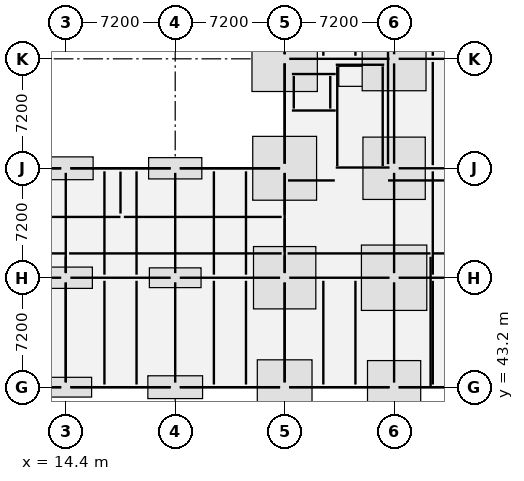
"""IFC4 building model, lengths in metres.
Left out: names, types, materials, properties, quantities, classifications, styles, units other than length and angle.
Written with IfcOpenShell. Run it as: python <this file> out.ifc"""

import sys

from ifc_helpers import new_model, si_unit, direction, frame, frame_2d, origin, origin_2d, place, context, subcontext, project, spatial, rectangle, extrude, element, fill, save


model = new_model("IFC4")
c1 = context("Model", 3, precision=1e-05, world=origin(), true_north=direction((0.0, 1.0)))
c2 = subcontext(c1, "Body", "Model", "MODEL_VIEW")
j1 = project(units=[si_unit("LENGTHUNIT", "METRE"), si_unit("PLANEANGLEUNIT", "RADIAN")], contexts=[c1])
p1 = place(None, origin())
s1 = spatial("IfcSite", under=j1, at=p1, CompositionType="ELEMENT")
p2 = place(p1, origin())
s2 = spatial("IfcBuilding", under=s1, at=p2, CompositionType="ELEMENT")
p3 = place(p2, origin())
s3 = spatial("IfcBuildingStorey", under=s2, at=p3, CompositionType="ELEMENT", Elevation=0.0)
for number, where, z_axis, x_axis in (
    (1, (14.4, 43.2, 0.0), (0.0, 0.0, 1.0), (1.0, 0.0, 0.0)),
    (2, (14.4, 50.4, 0.0), (0.0, 0.0, 1.0), (1.0, 0.0, 0.0)),
    (3, (14.4, 57.6, 0.0), (0.0, 0.0, 1.0), (1.0, 0.0, 0.0)),
    (4, (21.6, 43.2, 0.0), (0.0, 0.0, 1.0), (1.0, 0.0, 0.0)),
    (5, (21.6, 50.4, 0.0), (0.0, 0.0, 1.0), (1.0, 0.0, 0.0)),
    (6, (21.6, 57.6, 0.0), (0.0, 0.0, 1.0), (1.0, 0.0, 0.0)),
    (7, (28.8, 43.2, 0.0), (0.0, 0.0, 1.0), (1.0, 0.0, 0.0)),
    (8, (28.8, 50.4, 0.0), (0.0, 0.0, 1.0), (1.0, 0.0, 0.0)),
    (9, (28.8, 57.6, 0.0), (0.0, 0.0, 1.0), (1.0, 0.0, 0.0)),
    (10, (28.8, 64.8, 0.0), (0.0, 0.0, 1.0), (1.0, 0.0, 0.0)),
    (11, (36.0, 43.2, 0.0), (0.0, 0.0, 1.0), (1.0, 0.0, 0.0)),
    (12, (36.0, 50.4, 0.0), (0.0, 0.0, 1.0), (1.0, 0.0, 0.0)),
    (13, (36.0, 57.6, 0.0), (0.0, 0.0, 1.0), (1.0, 0.0, 0.0)),
    (14, (36.0, 64.8, 0.0), (0.0, 0.0, 1.0), (1.0, 0.0, 0.0)),
):
    element("IfcColumn", number, at=place(p3, frame(where, z_axis=z_axis, x_axis=x_axis)), inside=s3, PredefinedType="COLUMN", context=c2, shape_type="SweptSolid", body=[
        extrude(rectangle(XDim=0.6, YDim=0.6, at=origin_2d()), origin(), (0.0, 0.0, 1.0), 5.4),
    ])
p4 = place(p3, frame((29.275, 61.4, 0.0), z_axis=(0.0, 0.0, 1.0), x_axis=(1.0, 0.0, 0.0)))
e15 = element("IfcWall", 15, at=p4, inside=s3, PredefinedType="SHEAR", context=c2, shape_type="SweptSolid", body=[
    extrude(rectangle(XDim=2.885, YDim=0.25, at=frame_2d((1.442, 0.0))), origin(), (0.0, 0.0, 1.0), 5.15),
])
p5 = place(p4, frame((0.942, 0.0, 0.0)))
e16 = element("IfcOpeningElement", 16, at=p5, cuts=e15, PredefinedType="OPENING", context=c2, shape_type="SweptSolid", body=[
    extrude(rectangle(XDim=1.0, YDim=2.1, at=frame_2d((0.5, 1.05))), frame((0.0, 0.137, 0.0), z_axis=(0.0, -1.0, 0.0), x_axis=(1.0, 0.0, 0.0)), (0.0, 0.0, 1.0), 0.274),
])
p6 = place(p3, frame((29.275, 63.8, 0.0), z_axis=(0.0, 0.0, 1.0), x_axis=(1.0, 0.0, 0.0)))
e17 = element("IfcWall", 17, at=p6, inside=s3, PredefinedType="SHEAR", context=c2, shape_type="SweptSolid", body=[
    extrude(rectangle(XDim=2.885, YDim=0.25, at=frame_2d((1.442, 0.0))), origin(), (0.0, 0.0, 1.0), 5.15),
])
for number, where, z_axis, x_axis in (
    (18, (29.4, 61.525, 0.0), (0.0, 0.0, 1.0), (0.0, 1.0, 0.0)),
    (19, (31.8, 61.525, 0.0), (0.0, 0.0, 1.0), (0.0, 1.0, 0.0)),
):
    element("IfcWall", number, at=place(p3, frame(where, z_axis=z_axis, x_axis=x_axis)), inside=s3, PredefinedType="SHEAR", context=c2, shape_type="SweptSolid", body=[
        extrude(rectangle(XDim=2.15, YDim=0.25, at=frame_2d((1.075, 0.0))), origin(), (0.0, 0.0, 1.0), 5.15),
    ])
p7 = place(p3, frame((32.16, 57.65, 0.0), z_axis=(0.0, 0.0, 1.0), x_axis=(1.0, 0.0, 0.0)))
e20 = element("IfcWall", 20, at=p7, inside=s3, PredefinedType="SHEAR", context=c2, shape_type="SweptSolid", body=[
    extrude(rectangle(XDim=3.54, YDim=0.2, at=frame_2d((1.77, 0.0))), origin(), (0.0, 0.0, 1.0), 5.15),
])
p8 = place(p7, frame((1.22, 0.0, 0.0)))
e21 = element("IfcOpeningElement", 21, at=p8, cuts=e20, PredefinedType="OPENING", context=c2, shape_type="SweptSolid", body=[
    extrude(rectangle(XDim=1.1, YDim=2.15, at=frame_2d((0.55, 1.075))), frame((0.0, 0.112, 0.0), z_axis=(0.0, -1.0, 0.0), x_axis=(1.0, 0.0, 0.0)), (0.0, 0.0, 1.0), 0.224),
])
p9 = place(p3, frame((32.16, 64.41, 0.0), z_axis=(0.0, 0.0, 1.0), x_axis=(1.0, 0.0, 0.0)))
e22 = element("IfcWall", 22, at=p9, inside=s3, PredefinedType="SHEAR", context=c2, shape_type="SweptSolid", body=[
    extrude(rectangle(XDim=3.19, YDim=0.2, at=frame_2d((1.595, 0.0))), origin(), (0.0, 0.0, 1.0), 5.15),
])
for number, where, z_axis, x_axis in (
    (23, (32.26, 57.75, 0.0), (0.0, 0.0, 1.0), (0.0, 1.0, 0.0)),
    (24, (35.25, 57.75, 0.0), (0.0, 0.0, 1.0), (0.0, 1.0, 0.0)),
):
    element("IfcWall", number, at=place(p3, frame(where, z_axis=z_axis, x_axis=x_axis)), inside=s3, PredefinedType="SHEAR", context=c2, shape_type="SweptSolid", body=[
        extrude(rectangle(XDim=6.56, YDim=0.2, at=frame_2d((3.28, 0.0))), origin(), (0.0, 0.0, 1.0), 5.15),
    ])
p10 = place(p3, frame((7.5, 57.6, 0.0), z_axis=(0.0, 0.0, 1.0), x_axis=(1.0, 0.0, 0.0)))
e25 = element("IfcWall", 25, at=p10, inside=s3, PredefinedType="ELEMENTEDWALL", context=c2, shape_type="SweptSolid", body=[
    extrude(rectangle(XDim=6.6, YDim=0.32, at=frame_2d((3.3, 0.0))), origin(), (0.0, 0.0, 1.0), 4.39),
])
p11 = place(p10, frame((2.4, 0.0, 0.85)))
e26 = element("IfcOpeningElement", 26, at=p11, cuts=e25, PredefinedType="OPENING", context=c2, shape_type="SweptSolid", body=[
    extrude(rectangle(XDim=1.8, YDim=2.2, at=frame_2d((0.9, 1.1))), frame((0.0, 0.172, 0.0), z_axis=(0.0, -1.0, 0.0), x_axis=(1.0, 0.0, 0.0)), (0.0, 0.0, 1.0), 0.344),
])
p12 = place(p3, frame((17.8, 57.6, 0.0), z_axis=(0.0, 0.0, 1.0), x_axis=(1.0, 0.0, 0.0)))
e27 = element("IfcWall", 27, at=p12, inside=s3, PredefinedType="SOLIDWALL", context=c2, shape_type="SweptSolid", body=[
    extrude(rectangle(XDim=0.4, YDim=0.36, at=frame_2d((0.2, 0.0))), origin(), (0.0, 0.0, 1.0), 4.45),
])
p13 = place(p3, frame((21.9, 57.6, 0.0), z_axis=(0.0, 0.0, 1.0), x_axis=(1.0, 0.0, 0.0)))
e28 = element("IfcWall", 28, at=p13, inside=s3, PredefinedType="ELEMENTEDWALL", context=c2, shape_type="SweptSolid", body=[
    extrude(rectangle(XDim=6.6, YDim=0.32, at=frame_2d((3.3, 0.0))), origin(), (0.0, 0.0, 1.0), 4.4),
])
p14 = place(p13, frame((2.625, 0.0, 0.85)))
e29 = element("IfcOpeningElement", 29, at=p14, cuts=e28, PredefinedType="OPENING", context=c2, shape_type="SweptSolid", body=[
    extrude(rectangle(XDim=1.35, YDim=2.0, at=frame_2d((0.675, 1.0))), frame((0.0, 0.172, 0.0), z_axis=(0.0, -1.0, 0.0), x_axis=(1.0, 0.0, 0.0)), (0.0, 0.0, 1.0), 0.344),
])
p15 = place(p3, frame((28.8, 61.0, 0.0), z_axis=(0.0, 0.0, 1.0), x_axis=(0.0, 1.0, 0.0)))
e30 = element("IfcWall", 30, at=p15, inside=s3, PredefinedType="SOLIDWALL", context=c2, shape_type="SweptSolid", body=[
    extrude(rectangle(XDim=0.4, YDim=0.36, at=frame_2d((0.2, 0.0))), origin(), (0.0, 0.0, 1.0), 4.54),
])
p16 = place(p3, frame((35.7, 43.2, 0.0), z_axis=(0.0, 0.0, 1.0), x_axis=(-1.0, 0.0, 0.0)))
e31 = element("IfcWall", 31, at=p16, inside=s3, PredefinedType="ELEMENTEDWALL", context=c2, shape_type="SweptSolid", body=[
    extrude(rectangle(XDim=6.6, YDim=0.32, at=frame_2d((3.3, 0.0))), origin(), (0.0, 0.0, 1.0), 4.49),
])
p17 = place(p16, frame((2.625, 0.0, 0.85)))
e32 = element("IfcOpeningElement", 32, at=p17, cuts=e31, PredefinedType="OPENING", context=c2, shape_type="SweptSolid", body=[
    extrude(rectangle(XDim=1.35, YDim=2.0, at=frame_2d((0.675, 1.0))), frame((0.0, 0.172, 0.0), z_axis=(0.0, -1.0, 0.0), x_axis=(1.0, 0.0, 0.0)), (0.0, 0.0, 1.0), 0.344),
])
p18 = place(p3, frame((25.4, 43.2, 0.0), z_axis=(0.0, 0.0, 1.0), x_axis=(-1.0, 0.0, 0.0)))
e33 = element("IfcWall", 33, at=p18, inside=s3, PredefinedType="SOLIDWALL", context=c2, shape_type="SweptSolid", body=[
    extrude(rectangle(XDim=0.4, YDim=0.36, at=frame_2d((0.2, 0.0))), origin(), (0.0, 0.0, 1.0), 4.5),
])
p19 = place(p3, frame((21.3, 43.2, 0.0), z_axis=(0.0, 0.0, 1.0), x_axis=(-1.0, 0.0, 0.0)))
e34 = element("IfcWall", 34, at=p19, inside=s3, PredefinedType="ELEMENTEDWALL", context=c2, shape_type="SweptSolid", body=[
    extrude(rectangle(XDim=6.6, YDim=0.32, at=frame_2d((3.3, 0.0))), origin(), (0.0, 0.0, 1.0), 4.5),
])
p20 = place(p19, frame((2.75, 0.0, 0.85)))
e35 = element("IfcOpeningElement", 35, at=p20, cuts=e34, PredefinedType="OPENING", context=c2, shape_type="SweptSolid", body=[
    extrude(rectangle(XDim=1.1, YDim=1.75, at=frame_2d((0.55, 0.875))), frame((0.0, 0.172, 0.0), z_axis=(0.0, -1.0, 0.0), x_axis=(1.0, 0.0, 0.0)), (0.0, 0.0, 1.0), 0.344),
])
p21 = place(p3, frame((28.8, 52.1, 0.0), z_axis=(0.0, 0.0, 1.0), x_axis=(0.0, 1.0, 0.0)))
e36 = element("IfcWall", 36, at=p21, inside=s3, PredefinedType="PARTITIONING", context=c2, shape_type="SweptSolid", body=[
    extrude(rectangle(XDim=2.2, YDim=0.14, at=frame_2d((1.1, 0.0))), origin(), (0.0, 0.0, 1.0), 4.488),
])
p22 = place(p21, frame((0.25, 0.0, 0.0)))
e37 = element("IfcOpeningElement", 37, at=p22, cuts=e36, PredefinedType="OPENING", context=c2, shape_type="SweptSolid", body=[
    extrude(rectangle(XDim=1.65, YDim=2.2, at=frame_2d((0.825, 1.1))), frame((0.0, 0.082, 0.0), z_axis=(0.0, -1.0, 0.0), x_axis=(1.0, 0.0, 0.0)), (0.0, 0.0, 1.0), 0.164),
])
p23 = place(p3, frame((0.22, 52.0, 0.0), z_axis=(0.0, 0.0, 1.0), x_axis=(1.0, 0.0, 0.0)))
e38 = element("IfcWall", 38, at=p23, inside=s3, PredefinedType="PARTITIONING", context=c2, shape_type="SweptSolid", body=[
    extrude(rectangle(XDim=14.18, YDim=0.12, at=frame_2d((7.09, 0.0))), origin(), (0.0, 0.0, 1.0), 4.488),
])
p24 = place(p23, frame((7.59, 0.0, 0.0)))
e39 = element("IfcOpeningElement", 39, at=p24, cuts=e38, PredefinedType="OPENING", context=c2, shape_type="SweptSolid", body=[
    extrude(rectangle(XDim=1.0, YDim=2.15, at=frame_2d((0.5, 1.075))), frame((0.0, 0.072, 0.0), z_axis=(0.0, -1.0, 0.0), x_axis=(1.0, 0.0, 0.0)), (0.0, 0.0, 1.0), 0.144),
])
p25 = place(p3, frame((14.4, 43.54, 0.0), z_axis=(0.0, 0.0, 1.0), x_axis=(0.0, 1.0, 0.0)))
e40 = element("IfcWall", 40, at=p25, inside=s3, PredefinedType="PARTITIONING", context=c2, shape_type="SweptSolid", body=[
    extrude(rectangle(XDim=6.52, YDim=0.12, at=frame_2d((3.26, 0.0))), origin(), (0.0, 0.0, 1.0), 4.548),
])
p26 = place(p3, frame((14.4, 50.74, 0.0), z_axis=(0.0, 0.0, 1.0), x_axis=(0.0, 1.0, 0.0)))
e41 = element("IfcWall", 41, at=p26, inside=s3, PredefinedType="PARTITIONING", context=c2, shape_type="SweptSolid", body=[
    extrude(rectangle(XDim=1.04, YDim=0.12, at=frame_2d((0.52, 0.0))), origin(), (0.0, 0.0, 1.0), 4.498),
])
p27 = place(p3, frame((14.62, 52.0, 0.0), z_axis=(0.0, 0.0, 1.0), x_axis=(1.0, 0.0, 0.0)))
e42 = element("IfcWall", 42, at=p27, inside=s3, PredefinedType="PARTITIONING", context=c2, shape_type="SweptSolid", body=[
    extrude(rectangle(XDim=13.984, YDim=0.1, at=frame_2d((6.992, 0.0))), origin(), (0.0, 0.0, 1.0), 4.498),
])
p28 = place(p27, frame((5.492, 0.0, 0.0)))
e43 = element("IfcOpeningElement", 43, at=p28, cuts=e42, PredefinedType="OPENING", context=c2, shape_type="SweptSolid", body=[
    extrude(rectangle(XDim=1.0, YDim=2.15, at=frame_2d((0.5, 1.075))), frame((0.0, 0.062, 0.0), z_axis=(0.0, -1.0, 0.0), x_axis=(1.0, 0.0, 0.0)), (0.0, 0.0, 1.0), 0.124),
])
p29 = place(p3, frame((28.8, 43.54, 0.0), z_axis=(0.0, 0.0, 1.0), x_axis=(0.0, 1.0, 0.0)))
e44 = element("IfcWall", 44, at=p29, inside=s3, PredefinedType="PARTITIONING", context=c2, shape_type="SweptSolid", body=[
    extrude(rectangle(XDim=6.52, YDim=0.1, at=frame_2d((3.26, 0.0))), origin(), (0.0, 0.0, 1.0), 4.538),
])
p30 = place(p3, frame((28.8, 50.74, 0.0), z_axis=(0.0, 0.0, 1.0), x_axis=(0.0, 1.0, 0.0)))
e45 = element("IfcWall", 45, at=p30, inside=s3, PredefinedType="PARTITIONING", context=c2, shape_type="SweptSolid", body=[
    extrude(rectangle(XDim=1.14, YDim=0.1, at=frame_2d((0.57, 0.0))), origin(), (0.0, 0.0, 1.0), 4.488),
])
p31 = place(p3, frame((0.22, 54.4, 0.0), z_axis=(0.0, 0.0, 1.0), x_axis=(1.0, 0.0, 0.0)))
e46 = element("IfcWall", 46, at=p31, inside=s3, PredefinedType="PARTITIONING", context=c2, shape_type="SweptSolid", body=[
    extrude(rectangle(XDim=17.78, YDim=0.12, at=frame_2d((8.89, 0.0))), origin(), (0.0, 0.0, 1.0), 4.488),
])
p32 = place(p31, frame((8.39, 0.0, 0.0)))
e47 = element("IfcOpeningElement", 47, at=p32, cuts=e46, PredefinedType="OPENING", context=c2, shape_type="SweptSolid", body=[
    extrude(rectangle(XDim=1.0, YDim=2.15, at=frame_2d((0.5, 1.075))), frame((0.0, 0.072, 0.0), z_axis=(0.0, -1.0, 0.0), x_axis=(1.0, 0.0, 0.0)), (0.0, 0.0, 1.0), 0.144),
])
p33 = place(p3, frame((18.0, 54.62, 0.0), z_axis=(0.0, 0.0, 1.0), x_axis=(0.0, 1.0, 0.0)))
e48 = element("IfcWall", 48, at=p33, inside=s3, PredefinedType="PARTITIONING", context=c2, shape_type="SweptSolid", body=[
    extrude(rectangle(XDim=2.76, YDim=0.12, at=frame_2d((1.38, 0.0))), origin(), (0.0, 0.0, 1.0), 4.448),
])
p34 = place(p3, frame((18.22, 54.4, 0.0), z_axis=(0.0, 0.0, 1.0), x_axis=(1.0, 0.0, 0.0)))
e49 = element("IfcWall", 49, at=p34, inside=s3, PredefinedType="PLUMBINGWALL", context=c2, shape_type="SweptSolid", body=[
    extrude(rectangle(XDim=10.384, YDim=0.18, at=frame_2d((5.192, 0.0))), origin(), (0.0, 0.0, 1.0), 4.498),
])
p35 = place(p34, frame((4.742, 0.0, 0.0)))
e50 = element("IfcOpeningElement", 50, at=p35, cuts=e49, PredefinedType="OPENING", context=c2, shape_type="SweptSolid", body=[
    extrude(rectangle(XDim=0.9, YDim=2.1, at=frame_2d((0.45, 1.05))), frame((0.0, 0.102, 0.0), z_axis=(0.0, -1.0, 0.0), x_axis=(1.0, 0.0, 0.0)), (0.0, 0.0, 1.0), 0.204),
])
p36 = place(p3, frame((28.8, 54.52, 0.0), z_axis=(0.0, 0.0, 1.0), x_axis=(0.0, 1.0, 0.0)))
e51 = element("IfcWall", 51, at=p36, inside=s3, PredefinedType="PLUMBINGWALL", context=c2, shape_type="SweptSolid", body=[
    extrude(rectangle(XDim=2.74, YDim=0.18, at=frame_2d((1.37, 0.0))), origin(), (0.0, 0.0, 1.0), 4.488),
])
p37 = place(p3, frame((29.02, 56.8, 0.0), z_axis=(0.0, 0.0, 1.0), x_axis=(1.0, 0.0, 0.0)))
e52 = element("IfcWall", 52, at=p37, inside=s3, PredefinedType="STANDARD", context=c2, shape_type="SweptSolid", body=[
    extrude(rectangle(XDim=3.08, YDim=0.22, at=frame_2d((1.54, 0.0))), origin(), (0.0, 0.0, 1.0), 5.12),
])
p38 = place(p37, frame((0.94, 0.0, 0.0)))
e53 = element("IfcOpeningElement", 53, at=p38, cuts=e52, PredefinedType="OPENING", context=c2, shape_type="SweptSolid", body=[
    extrude(rectangle(XDim=1.2, YDim=2.2, at=frame_2d((0.6, 1.1))), frame((0.0, 0.122, 0.0), z_axis=(0.0, -1.0, 0.0), x_axis=(1.0, 0.0, 0.0)), (0.0, 0.0, 1.0), 0.244),
])
p39 = place(p3, frame((28.996, 52.0, 0.0), z_axis=(0.0, 0.0, 1.0), x_axis=(1.0, 0.0, 0.0)))
e54 = element("IfcWall", 54, at=p39, inside=s3, PredefinedType="PLUMBINGWALL", context=c2, shape_type="SweptSolid", body=[
    extrude(rectangle(XDim=9.404, YDim=0.18, at=frame_2d((4.702, 0.0))), origin(), (0.0, 0.0, 1.0), 4.488),
])
p40 = place(p39, frame((4.202, 0.0, 0.0)))
e55 = element("IfcOpeningElement", 55, at=p40, cuts=e54, PredefinedType="OPENING", context=c2, shape_type="SweptSolid", body=[
    extrude(rectangle(XDim=1.0, YDim=2.15, at=frame_2d((0.5, 1.075))), frame((0.0, 0.102, 0.0), z_axis=(0.0, -1.0, 0.0), x_axis=(1.0, 0.0, 0.0)), (0.0, 0.0, 1.0), 0.204),
])
p41 = place(p3, frame((38.4, 43.2, 0.0), z_axis=(0.0, 0.0, 1.0), x_axis=(0.0, 1.0, 0.0)))
e56 = element("IfcWall", 56, at=p41, inside=s3, PredefinedType="PLUMBINGWALL", context=c2, shape_type="SweptSolid", body=[
    extrude(rectangle(XDim=8.58, YDim=0.18, at=frame_2d((4.29, 0.0))), origin(), (0.0, 0.0, 1.0), 4.388),
])
p42 = place(p3, frame((38.62, 52.0, 0.0), z_axis=(0.0, 0.0, 1.0), x_axis=(1.0, 0.0, 0.0)))
e57 = element("IfcWall", 57, at=p42, inside=s3, PredefinedType="PLUMBINGWALL", context=c2, shape_type="SweptSolid", body=[
    extrude(rectangle(XDim=8.78, YDim=0.18, at=frame_2d((4.39, 0.0))), origin(), (0.0, 0.0, 1.0), 4.488),
])
p43 = place(p42, frame((3.19, 0.0, 0.0)))
e58 = element("IfcOpeningElement", 58, at=p43, cuts=e57, PredefinedType="OPENING", context=c2, shape_type="SweptSolid", body=[
    extrude(rectangle(XDim=0.9, YDim=2.1, at=frame_2d((0.45, 1.05))), frame((0.0, 0.102, 0.0), z_axis=(0.0, -1.0, 0.0), x_axis=(1.0, 0.0, 0.0)), (0.0, 0.0, 1.0), 0.204),
])
p44 = place(p3, frame((35.6, 56.8, 0.0), z_axis=(0.0, 0.0, 1.0), x_axis=(1.0, 0.0, 0.0)))
e59 = element("IfcWall", 59, at=p44, inside=s3, PredefinedType="PARTITIONING", context=c2, shape_type="SweptSolid", body=[
    extrude(rectangle(XDim=17.2, YDim=0.12, at=frame_2d((8.6, 0.0))), origin(), (0.0, 0.0, 1.0), 4.488),
])
p45 = place(p44, frame((8.225, 0.0, 0.0)))
e60 = element("IfcOpeningElement", 60, at=p45, cuts=e59, PredefinedType="OPENING", context=c2, shape_type="SweptSolid", body=[
    extrude(rectangle(XDim=1.25, YDim=2.15, at=frame_2d((0.625, 1.075))), frame((0.0, 0.072, 0.0), z_axis=(0.0, -1.0, 0.0), x_axis=(1.0, 0.0, 0.0)), (0.0, 0.0, 1.0), 0.144),
])
p46 = place(p3, frame((35.6, 57.87, 0.0), z_axis=(0.0, 0.0, 1.0), x_axis=(0.0, 1.0, 0.0)))
e61 = element("IfcWall", 61, at=p46, inside=s3, PredefinedType="PARTITIONING", context=c2, shape_type="SweptSolid", body=[
    extrude(rectangle(XDim=14.13, YDim=0.12, at=frame_2d((7.065, 0.0))), origin(), (0.0, 0.0, 1.0), 4.438),
])
p47 = place(p14, origin())
e62 = element("IfcWindow", 62, at=p47, inside=s3, PartitioningType="SINGLE_PANEL", PredefinedType="WINDOW", context=c2, shape_type="SweptSolid", body=[
    extrude(rectangle(XDim=1.35, YDim=2.0, at=frame_2d((0.675, 1.0))), frame((0.0, 0.03, 0.0), z_axis=(0.0, -1.0, 0.0), x_axis=(1.0, 0.0, 0.0)), (0.0, 0.0, 1.0), 0.06),
])
fill(e29, e62)
p48 = place(p17, origin())
e63 = element("IfcWindow", 63, at=p48, inside=s3, PartitioningType="SINGLE_PANEL", PredefinedType="WINDOW", context=c2, shape_type="SweptSolid", body=[
    extrude(rectangle(XDim=1.35, YDim=2.0, at=frame_2d((0.675, 1.0))), frame((0.0, 0.03, 0.0), z_axis=(0.0, -1.0, 0.0), x_axis=(1.0, 0.0, 0.0)), (0.0, 0.0, 1.0), 0.06),
])
fill(e32, e63)
p49 = place(p20, origin())
e64 = element("IfcWindow", 64, at=p49, inside=s3, PartitioningType="SINGLE_PANEL", PredefinedType="WINDOW", context=c2, shape_type="SweptSolid", body=[
    extrude(rectangle(XDim=1.1, YDim=1.75, at=frame_2d((0.55, 0.875))), frame((0.0, 0.03, 0.0), z_axis=(0.0, -1.0, 0.0), x_axis=(1.0, 0.0, 0.0)), (0.0, 0.0, 1.0), 0.06),
])
fill(e35, e64)
p50 = place(p22, origin())
e65 = element("IfcDoor", 65, at=p50, inside=s3, OperationType="DOUBLE_SWING_LEFT", PredefinedType="DOOR", context=c2, shape_type="SweptSolid", body=[
    extrude(rectangle(XDim=1.65, YDim=2.2, at=frame_2d((0.825, 1.1))), frame((0.0, 0.025, 0.0), z_axis=(0.0, -1.0, 0.0), x_axis=(1.0, 0.0, 0.0)), (0.0, 0.0, 1.0), 0.05),
])
fill(e37, e65)
p51 = place(p8, frame((1.1, 0.0, 0.0), z_axis=(0.0, 0.0, 1.0), x_axis=(-1.0, 0.0, 0.0)))
e66 = element("IfcDoor", 66, at=p51, inside=s3, OperationType="SINGLE_SWING_LEFT", PredefinedType="DOOR", context=c2, shape_type="SweptSolid", body=[
    extrude(rectangle(XDim=1.1, YDim=2.15, at=frame_2d((0.55, 1.075))), frame((0.0, 0.025, 0.0), z_axis=(0.0, -1.0, 0.0), x_axis=(1.0, 0.0, 0.0)), (0.0, 0.0, 1.0), 0.05),
])
fill(e21, e66)
p52 = place(p5, origin())
e67 = element("IfcDoor", 67, at=p52, inside=s3, OperationType="SLIDING_TO_RIGHT", PredefinedType="DOOR", context=c2, shape_type="SweptSolid", body=[
    extrude(rectangle(XDim=1.0, YDim=2.1, at=frame_2d((0.5, 1.05))), frame((0.0, 0.025, 0.0), z_axis=(0.0, -1.0, 0.0), x_axis=(1.0, 0.0, 0.0)), (0.0, 0.0, 1.0), 0.05),
])
fill(e16, e67)
p53 = place(p28, origin())
e68 = element("IfcDoor", 68, at=p53, inside=s3, OperationType="SINGLE_SWING_RIGHT", PredefinedType="DOOR", context=c2, shape_type="SweptSolid", body=[
    extrude(rectangle(XDim=1.0, YDim=2.15, at=frame_2d((0.5, 1.075))), frame((0.0, 0.025, 0.0), z_axis=(0.0, -1.0, 0.0), x_axis=(1.0, 0.0, 0.0)), (0.0, 0.0, 1.0), 0.05),
])
fill(e43, e68)
p54 = place(p35, origin())
e69 = element("IfcDoor", 69, at=p54, inside=s3, OperationType="SINGLE_SWING_RIGHT", PredefinedType="DOOR", context=c2, shape_type="SweptSolid", body=[
    extrude(rectangle(XDim=0.9, YDim=2.1, at=frame_2d((0.45, 1.05))), frame((0.0, 0.025, 0.0), z_axis=(0.0, -1.0, 0.0), x_axis=(1.0, 0.0, 0.0)), (0.0, 0.0, 1.0), 0.05),
])
fill(e50, e69)
p55 = place(p38, origin())
e70 = element("IfcDoor", 70, at=p55, inside=s3, OperationType="SINGLE_SWING_LEFT", PredefinedType="DOOR", context=c2, shape_type="SweptSolid", body=[
    extrude(rectangle(XDim=1.2, YDim=2.2, at=frame_2d((0.6, 1.1))), frame((0.0, 0.025, 0.0), z_axis=(0.0, -1.0, 0.0), x_axis=(1.0, 0.0, 0.0)), (0.0, 0.0, 1.0), 0.05),
])
fill(e53, e70)
p56 = place(p40, origin())
e71 = element("IfcDoor", 71, at=p56, inside=s3, OperationType="SINGLE_SWING_RIGHT", PredefinedType="DOOR", context=c2, shape_type="SweptSolid", body=[
    extrude(rectangle(XDim=1.0, YDim=2.15, at=frame_2d((0.5, 1.075))), frame((0.0, 0.025, 0.0), z_axis=(0.0, -1.0, 0.0), x_axis=(1.0, 0.0, 0.0)), (0.0, 0.0, 1.0), 0.05),
])
fill(e55, e71)
save(model, sys.argv[1])
